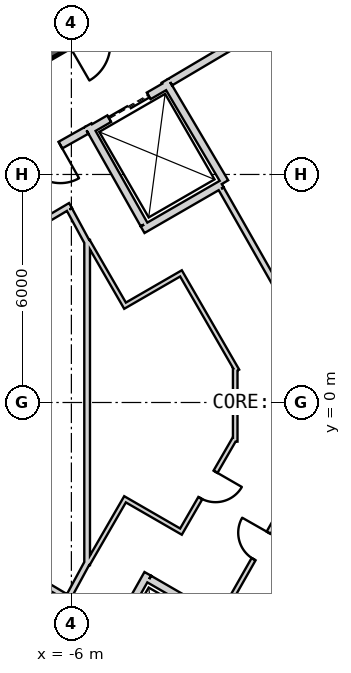
"""IFC4 building model, lengths in metres.
Left out: names, types, materials, properties, quantities, classifications, styles, units other than length and angle.
Written with IfcOpenShell. Run it as: python <this file> out.ifc"""

import sys

from ifc_helpers import new_model, si_unit, direction, frame, frame_2d, origin, place, context, subcontext, project, spatial, rectangle, extrude, element, fill, save


model = new_model("IFC4")
c1 = context("Model", 3, precision=1e-05, world=origin(), true_north=direction((0.0, 1.0)))
c2 = subcontext(c1, "Body", "Model", "MODEL_VIEW")
j1 = project(units=[si_unit("LENGTHUNIT", "METRE"), si_unit("PLANEANGLEUNIT", "RADIAN")], contexts=[c1])
p1 = place(None, origin())
s1 = spatial("IfcSite", under=j1, at=p1, CompositionType="ELEMENT")
p2 = place(p1, origin())
s2 = spatial("IfcBuilding", under=s1, at=p2, CompositionType="ELEMENT")
p3 = place(p2, origin())
s3 = spatial("IfcBuildingStorey", under=s2, at=p3, CompositionType="ELEMENT", Elevation=0.0)
p4 = place(p3, frame((19.475, 2.208, 0.0), z_axis=(0.0, 0.0, 1.0), x_axis=(-0.866028369851, 0.499994862586, 0.0)))
e1 = element("IfcWall", 1, at=p4, inside=s3, PredefinedType="SHEAR", context=c2, shape_type="SweptSolid", body=[
    extrude(rectangle(XDim=31.523, YDim=0.9, at=frame_2d((15.762, 0.0))), origin(), (0.0, 0.0, 1.0), 9.0),
])
p5 = place(p4, frame((7.062, 0.0, 0.0)))
e2 = element("IfcOpeningElement", 2, at=p5, cuts=e1, PredefinedType="OPENING", context=c2, shape_type="SweptSolid", body=[
    extrude(rectangle(XDim=1.2, YDim=2.4, at=frame_2d((0.6, 1.2))), frame((0.0, 0.46, 0.0), z_axis=(0.0, -1.0, 0.0), x_axis=(1.0, 0.0, 0.0)), (0.0, 0.0, 1.0), 0.92),
])
p6 = place(p4, frame((9.762, 0.0, 0.0)))
e3 = element("IfcOpeningElement", 3, at=p6, cuts=e1, PredefinedType="OPENING", context=c2, shape_type="SweptSolid", body=[
    extrude(rectangle(XDim=1.2, YDim=2.4, at=frame_2d((0.6, 1.2))), frame((0.0, 0.46, 0.0), z_axis=(0.0, -1.0, 0.0), x_axis=(1.0, 0.0, 0.0)), (0.0, 0.0, 1.0), 0.92),
])
p7 = place(p4, frame((12.462, 0.0, 0.0)))
e4 = element("IfcOpeningElement", 4, at=p7, cuts=e1, PredefinedType="OPENING", context=c2, shape_type="SweptSolid", body=[
    extrude(rectangle(XDim=1.2, YDim=2.4, at=frame_2d((0.6, 1.2))), frame((0.0, 0.46, 0.0), z_axis=(0.0, -1.0, 0.0), x_axis=(1.0, 0.0, 0.0)), (0.0, 0.0, 1.0), 0.92),
])
p8 = place(p4, frame((15.162, 0.0, 0.0)))
e5 = element("IfcOpeningElement", 5, at=p8, cuts=e1, PredefinedType="OPENING", context=c2, shape_type="SweptSolid", body=[
    extrude(rectangle(XDim=1.2, YDim=2.4, at=frame_2d((0.6, 1.2))), frame((0.0, 0.46, 0.0), z_axis=(0.0, -1.0, 0.0), x_axis=(1.0, 0.0, 0.0)), (0.0, 0.0, 1.0), 0.92),
])
p9 = place(p4, frame((17.862, 0.0, 0.0)))
e6 = element("IfcOpeningElement", 6, at=p9, cuts=e1, PredefinedType="OPENING", context=c2, shape_type="SweptSolid", body=[
    extrude(rectangle(XDim=1.2, YDim=2.4, at=frame_2d((0.6, 1.2))), frame((0.0, 0.46, 0.0), z_axis=(0.0, -1.0, 0.0), x_axis=(1.0, 0.0, 0.0)), (0.0, 0.0, 1.0), 0.92),
])
p10 = place(p4, frame((20.562, 0.0, 0.0)))
e7 = element("IfcOpeningElement", 7, at=p10, cuts=e1, PredefinedType="OPENING", context=c2, shape_type="SweptSolid", body=[
    extrude(rectangle(XDim=1.2, YDim=2.4, at=frame_2d((0.6, 1.2))), frame((0.0, 0.46, 0.0), z_axis=(0.0, -1.0, 0.0), x_axis=(1.0, 0.0, 0.0)), (0.0, 0.0, 1.0), 0.92),
])
p11 = place(p4, frame((23.262, 0.0, 0.0)))
e8 = element("IfcOpeningElement", 8, at=p11, cuts=e1, PredefinedType="OPENING", context=c2, shape_type="SweptSolid", body=[
    extrude(rectangle(XDim=1.2, YDim=2.4, at=frame_2d((0.6, 1.2))), frame((0.0, 0.46, 0.0), z_axis=(0.0, -1.0, 0.0), x_axis=(1.0, 0.0, 0.0)), (0.0, 0.0, 1.0), 0.92),
])
p12 = place(p4, frame((3.612, 0.0, 0.0)))
e9 = element("IfcOpeningElement", 9, at=p12, cuts=e1, PredefinedType="OPENING", context=c2, shape_type="SweptSolid", body=[
    extrude(rectangle(XDim=1.2, YDim=2.4, at=frame_2d((0.6, 1.2))), frame((0.0, 0.46, 0.0), z_axis=(0.0, -1.0, 0.0), x_axis=(1.0, 0.0, 0.0)), (0.0, 0.0, 1.0), 0.92),
])
p13 = place(p4, frame((26.712, 0.0, 0.0)))
e10 = element("IfcOpeningElement", 10, at=p13, cuts=e1, PredefinedType="OPENING", context=c2, shape_type="SweptSolid", body=[
    extrude(rectangle(XDim=1.2, YDim=2.4, at=frame_2d((0.6, 1.2))), frame((0.0, 0.46, 0.0), z_axis=(0.0, -1.0, 0.0), x_axis=(1.0, 0.0, 0.0)), (0.0, 0.0, 1.0), 0.92),
])
p14 = place(p3, frame((-7.825, -17.97, 0.0), z_axis=(0.0, 0.0, 1.0), x_axis=(0.866028369851, 0.499994862586, 0.0)))
e11 = element("IfcWall", 11, at=p14, inside=s3, PredefinedType="SHEAR", context=c2, shape_type="SweptSolid", body=[
    extrude(rectangle(XDim=31.523, YDim=0.9, at=frame_2d((15.762, 0.0))), origin(), (0.0, 0.0, 1.0), 9.0),
])
p15 = place(p14, frame((7.062, 0.0, 0.0)))
e12 = element("IfcOpeningElement", 12, at=p15, cuts=e11, PredefinedType="OPENING", context=c2, shape_type="SweptSolid", body=[
    extrude(rectangle(XDim=1.2, YDim=2.4, at=frame_2d((0.6, 1.2))), frame((0.0, 0.46, 0.0), z_axis=(0.0, -1.0, 0.0), x_axis=(1.0, 0.0, 0.0)), (0.0, 0.0, 1.0), 0.92),
])
p16 = place(p14, frame((9.762, 0.0, 0.0)))
e13 = element("IfcOpeningElement", 13, at=p16, cuts=e11, PredefinedType="OPENING", context=c2, shape_type="SweptSolid", body=[
    extrude(rectangle(XDim=1.2, YDim=2.4, at=frame_2d((0.6, 1.2))), frame((0.0, 0.46, 0.0), z_axis=(0.0, -1.0, 0.0), x_axis=(1.0, 0.0, 0.0)), (0.0, 0.0, 1.0), 0.92),
])
p17 = place(p14, frame((12.462, 0.0, 0.0)))
e14 = element("IfcOpeningElement", 14, at=p17, cuts=e11, PredefinedType="OPENING", context=c2, shape_type="SweptSolid", body=[
    extrude(rectangle(XDim=1.2, YDim=2.4, at=frame_2d((0.6, 1.2))), frame((0.0, 0.46, 0.0), z_axis=(0.0, -1.0, 0.0), x_axis=(1.0, 0.0, 0.0)), (0.0, 0.0, 1.0), 0.92),
])
p18 = place(p14, frame((15.162, 0.0, 0.0)))
e15 = element("IfcOpeningElement", 15, at=p18, cuts=e11, PredefinedType="OPENING", context=c2, shape_type="SweptSolid", body=[
    extrude(rectangle(XDim=1.2, YDim=2.4, at=frame_2d((0.6, 1.2))), frame((0.0, 0.46, 0.0), z_axis=(0.0, -1.0, 0.0), x_axis=(1.0, 0.0, 0.0)), (0.0, 0.0, 1.0), 0.92),
])
p19 = place(p14, frame((17.862, 0.0, 0.0)))
e16 = element("IfcOpeningElement", 16, at=p19, cuts=e11, PredefinedType="OPENING", context=c2, shape_type="SweptSolid", body=[
    extrude(rectangle(XDim=1.2, YDim=2.4, at=frame_2d((0.6, 1.2))), frame((0.0, 0.46, 0.0), z_axis=(0.0, -1.0, 0.0), x_axis=(1.0, 0.0, 0.0)), (0.0, 0.0, 1.0), 0.92),
])
p20 = place(p14, frame((20.562, 0.0, 0.0)))
e17 = element("IfcOpeningElement", 17, at=p20, cuts=e11, PredefinedType="OPENING", context=c2, shape_type="SweptSolid", body=[
    extrude(rectangle(XDim=1.2, YDim=2.4, at=frame_2d((0.6, 1.2))), frame((0.0, 0.46, 0.0), z_axis=(0.0, -1.0, 0.0), x_axis=(1.0, 0.0, 0.0)), (0.0, 0.0, 1.0), 0.92),
])
p21 = place(p14, frame((26.712, 0.0, 0.0)))
e18 = element("IfcOpeningElement", 18, at=p21, cuts=e11, PredefinedType="OPENING", context=c2, shape_type="SweptSolid", body=[
    extrude(rectangle(XDim=1.2, YDim=2.4, at=frame_2d((0.6, 1.2))), frame((0.0, 0.46, 0.0), z_axis=(0.0, -1.0, 0.0), x_axis=(1.0, 0.0, 0.0)), (0.0, 0.0, 1.0), 0.92),
])
p22 = place(p14, frame((3.612, 0.0, 0.0)))
e19 = element("IfcOpeningElement", 19, at=p22, cuts=e11, PredefinedType="OPENING", context=c2, shape_type="SweptSolid", body=[
    extrude(rectangle(XDim=1.2, YDim=2.4, at=frame_2d((0.6, 1.2))), frame((0.0, 0.46, 0.0), z_axis=(0.0, -1.0, 0.0), x_axis=(1.0, 0.0, 0.0)), (0.0, 0.0, 1.0), 0.92),
])
p23 = place(p3, frame((0.483, 8.936, 0.0), z_axis=(0.0, 0.0, 1.0), x_axis=(-0.874269620932, 0.485440655401, 0.0)))
e20 = element("IfcWall", 20, at=p23, inside=s3, PredefinedType="PLUMBINGWALL", context=c2, shape_type="SweptSolid", body=[
    extrude(rectangle(XDim=1.845, YDim=0.2, at=frame_2d((0.922, 0.0))), origin(), (0.0, 0.0, 1.0), 8.7),
])
p24 = place(p3, frame((-7.159, 8.8, -0.4), z_axis=(0.0, 0.0, 1.0), x_axis=(0.866047807691, 0.499961193289, 0.0)))
e21 = element("IfcWall", 21, at=p24, inside=s3, PredefinedType="SHEAR", context=c2, shape_type="SweptSolid", body=[
    extrude(rectangle(XDim=3.6, YDim=0.2, at=frame_2d((1.8, 0.0))), origin(), (0.0, 0.0, 1.0), 9.1),
])
p25 = place(p24, frame((1.25, 0.0, 0.4)))
e22 = element("IfcOpeningElement", 22, at=p25, cuts=e21, PredefinedType="OPENING", context=c2, shape_type="SweptSolid", body=[
    extrude(rectangle(XDim=1.1, YDim=2.1, at=frame_2d((0.55, 1.05))), frame((0.0, 0.11, 0.0), z_axis=(0.0, -1.0, 0.0), x_axis=(1.0, 0.0, 0.0)), (0.0, 0.0, 1.0), 0.22),
])
p26 = place(p3, frame((-5.524, 7.168, 0.0), z_axis=(0.0, 0.0, 1.0), x_axis=(0.866024647952, 0.500001309137, 0.0)))
e23 = element("IfcWall", 23, at=p26, inside=s3, PredefinedType="PLUMBINGWALL", context=c2, shape_type="SweptSolid", body=[
    extrude(rectangle(XDim=2.4, YDim=0.2, at=frame_2d((1.2, 0.0))), origin(), (0.0, 0.0, 1.0), 8.7),
])
p27 = place(p26, frame((0.6, 0.0, 0.0)))
e24 = element("IfcOpeningElement", 24, at=p27, cuts=e23, PredefinedType="OPENING", context=c2, shape_type="SweptSolid", body=[
    extrude(rectangle(XDim=1.2, YDim=2.4, at=frame_2d((0.6, 1.2))), frame((0.0, 0.11, 0.0), z_axis=(0.0, -1.0, 0.0), x_axis=(1.0, 0.0, 0.0)), (0.0, 0.0, 1.0), 0.22),
])
p28 = place(p3, frame((-3.538, 8.465, 0.0), z_axis=(0.0, 0.0, 1.0), x_axis=(0.508647062354, -0.860975125052, 0.0)))
e25 = element("IfcWall", 25, at=p28, inside=s3, PredefinedType="PLUMBINGWALL", context=c2, shape_type="SweptSolid", body=[
    extrude(rectangle(XDim=3.1, YDim=0.2, at=frame_2d((1.55, 0.0))), origin(), (0.0, 0.0, 1.0), 8.7),
])
p29 = place(p3, frame((-2.043, 5.748, 0.0), z_axis=(0.0, 0.0, 1.0), x_axis=(-0.866035096217, -0.499983211839, 0.0)))
e26 = element("IfcWall", 26, at=p29, inside=s3, PredefinedType="PLUMBINGWALL", context=c2, shape_type="SweptSolid", body=[
    extrude(rectangle(XDim=2.404, YDim=0.2, at=frame_2d((1.202, 0.0))), origin(), (0.0, 0.0, 1.0), 8.7),
])
p30 = place(p3, frame((-5.562, 7.296, 0.0), z_axis=(0.0, 0.0, 1.0), x_axis=(0.49134651263, -0.870964180966, 0.0)))
e27 = element("IfcWall", 27, at=p30, inside=s3, PredefinedType="PLUMBINGWALL", context=c2, shape_type="SweptSolid", body=[
    extrude(rectangle(XDim=3.0, YDim=0.2, at=frame_2d((1.5, 0.0))), origin(), (0.0, 0.0, 1.0), 8.7),
])
p31 = place(p3, frame((-3.99, -4.509, 0.0), z_axis=(0.0, 0.0, 1.0), x_axis=(-0.491358283181, -0.870957540612, 0.0)))
e28 = element("IfcWall", 28, at=p31, inside=s3, PredefinedType="PLUMBINGWALL", context=c2, shape_type="SweptSolid", body=[
    extrude(rectangle(XDim=3.2, YDim=0.2, at=frame_2d((1.6, 0.0))), origin(), (0.0, 0.0, 1.0), 8.7),
])
p32 = place(p3, frame((-3.953, -4.646, 0.0), z_axis=(0.0, 0.0, 1.0), x_axis=(0.866038900241, -0.499976622722, 0.0)))
e29 = element("IfcWall", 29, at=p32, inside=s3, PredefinedType="PLUMBINGWALL", context=c2, shape_type="SweptSolid", body=[
    extrude(rectangle(XDim=2.189, YDim=0.2, at=frame_2d((1.095, 0.0))), origin(), (0.0, 0.0, 1.0), 8.7),
])
p33 = place(p3, frame((-1.18, 9.744, 0.0), z_axis=(0.0, 0.0, 1.0), x_axis=(-0.860615607571, -0.509255118781, 0.0)))
e30 = element("IfcWall", 30, at=p33, inside=s3, PredefinedType="PARTITIONING", context=c2, shape_type="SweptSolid", body=[
    extrude(rectangle(XDim=2.581, YDim=0.2, at=frame_2d((1.29, 0.0))), origin(), (0.0, 0.0, 1.0), 8.7),
])
p34 = place(p3, frame((-5.6, 7.16, 0.0), z_axis=(0.0, 0.0, 1.0), x_axis=(-0.871363259478, -0.490638431059, 0.0)))
e31 = element("IfcWall", 31, at=p34, inside=s3, PredefinedType="PARTITIONING", context=c2, shape_type="SweptSolid", body=[
    extrude(rectangle(XDim=2.581, YDim=0.2, at=frame_2d((1.291, 0.0))), origin(), (0.0, 0.0, 1.0), 8.7),
])
p35 = place(p34, frame((0.791, 0.0, 0.0)))
e32 = element("IfcOpeningElement", 32, at=p35, cuts=e31, PredefinedType="OPENING", context=c2, shape_type="SweptSolid", body=[
    extrude(rectangle(XDim=1.0, YDim=2.1, at=frame_2d((0.5, 1.05))), frame((0.0, 0.11, 0.0), z_axis=(0.0, -1.0, 0.0), x_axis=(1.0, 0.0, 0.0)), (0.0, 0.0, 1.0), 0.22),
])
p36 = place(p3, frame((-2.059, 5.624, 0.0), z_axis=(0.0, 0.0, 1.0), x_axis=(0.494149180773, -0.869377125959, 0.0)))
e33 = element("IfcWall", 33, at=p36, inside=s3, PredefinedType="PLUMBINGWALL", context=c2, shape_type="SweptSolid", body=[
    extrude(rectangle(XDim=4.231, YDim=0.15, at=frame_2d((2.116, 0.0))), origin(), (0.0, 0.0, 1.0), 8.7),
])
p37 = place(p3, frame((0.094, -1.836, 0.0), z_axis=(0.0, 0.0, 1.0), x_axis=(-0.494097972448, -0.869406230495, 0.0)))
e34 = element("IfcWall", 34, at=p37, inside=s3, PredefinedType="PARTITIONING", context=c2, shape_type="SweptSolid", body=[
    extrude(rectangle(XDim=4.357, YDim=0.12, at=frame_2d((2.179, 0.0))), origin(), (0.0, 0.0, 1.0), 8.7),
])
p38 = place(p37, frame((1.83, 0.0, 0.0)))
e35 = element("IfcOpeningElement", 35, at=p38, cuts=e34, PredefinedType="OPENING", context=c2, shape_type="SweptSolid", body=[
    extrude(rectangle(XDim=0.8, YDim=2.1, at=frame_2d((0.4, 1.05))), frame((0.0, 0.07, 0.0), z_axis=(0.0, -1.0, 0.0), x_axis=(1.0, 0.0, 0.0)), (0.0, 0.0, 1.0), 0.14),
])
p39 = place(p3, frame((-5.586, -4.275, 0.0), z_axis=(0.0, 0.0, 1.0), x_axis=(0.0, 1.0, 0.0)))
e36 = element("IfcWall", 36, at=p39, inside=s3, PredefinedType="PLUMBINGWALL", context=c2, shape_type="SweptSolid", body=[
    extrude(rectangle(XDim=8.549, YDim=0.15, at=frame_2d((4.275, 0.0))), origin(), (0.0, 0.0, 1.0), 8.7),
])
p40 = place(p3, frame((-6.124, -5.211, 0.0), z_axis=(0.0, 0.0, 1.0), x_axis=(0.476228984866, 0.879321303036, 0.0)))
e37 = element("IfcWall", 37, at=p40, inside=s3, PredefinedType="PLUMBINGWALL", context=c2, shape_type="SweptSolid", body=[
    extrude(rectangle(XDim=1.162, YDim=0.15, at=frame_2d((0.581, 0.0))), origin(), (0.0, 0.0, 1.0), 8.7),
])
p41 = place(p3, frame((-7.95, -4.041, 0.0), z_axis=(0.0, 0.0, 1.0), x_axis=(0.860090281069, -0.510141851263, 0.0)))
e38 = element("IfcWall", 38, at=p41, inside=s3, PredefinedType="PLUMBINGWALL", context=c2, shape_type="SweptSolid", body=[
    extrude(rectangle(XDim=2.089, YDim=0.15, at=frame_2d((1.045, 0.0))), origin(), (0.0, 0.0, 1.0), 8.7),
])
p42 = place(p3, frame((-6.024, 5.183, 0.0), z_axis=(0.0, 0.0, 1.0), x_axis=(-0.860126804455, -0.510080268447, 0.0)))
e39 = element("IfcWall", 39, at=p42, inside=s3, PredefinedType="PLUMBINGWALL", context=c2, shape_type="SweptSolid", body=[
    extrude(rectangle(XDim=2.24, YDim=0.15, at=frame_2d((1.12, 0.0))), origin(), (0.0, 0.0, 1.0), 8.7),
])
p43 = place(p42, frame((0.757, 0.0, 0.0)))
e40 = element("IfcOpeningElement", 40, at=p43, cuts=e39, PredefinedType="OPENING", context=c2, shape_type="SweptSolid", body=[
    extrude(rectangle(XDim=0.8, YDim=2.1, at=frame_2d((0.4, 1.05))), frame((0.0, 0.085, 0.0), z_axis=(0.0, -1.0, 0.0), x_axis=(1.0, 0.0, 0.0)), (0.0, 0.0, 1.0), 0.17),
])
p44 = place(p3, frame((-5.571, 4.19, 0.0), z_axis=(0.0, 0.0, 1.0), x_axis=(-0.476127658675, 0.879376172434, 0.0)))
e41 = element("IfcWall", 41, at=p44, inside=s3, PredefinedType="PLUMBINGWALL", context=c2, shape_type="SweptSolid", body=[
    extrude(rectangle(XDim=1.012, YDim=0.15, at=frame_2d((0.506, 0.0))), origin(), (0.0, 0.0, 1.0), 8.7),
])
p45 = place(p3, frame((-4.558, 2.495, 0.0), z_axis=(0.0, 0.0, 1.0), x_axis=(-0.499990325971, 0.866030989016, 0.0)))
e42 = element("IfcWall", 42, at=p45, inside=s3, PredefinedType="PARTITIONING", context=c2, shape_type="SweptSolid", body=[
    extrude(rectangle(XDim=2.025, YDim=0.12, at=frame_2d((1.012, 0.0))), origin(), (0.0, 0.0, 1.0), 8.7),
])
p46 = place(p3, frame((-3.064, 3.427, 0.0), z_axis=(0.0, 0.0, 1.0), x_axis=(-0.866087547558, -0.499892348375, 0.0)))
e43 = element("IfcWall", 43, at=p46, inside=s3, PredefinedType="PARTITIONING", context=c2, shape_type="SweptSolid", body=[
    extrude(rectangle(XDim=1.7, YDim=0.12, at=frame_2d((0.85, 0.0))), origin(), (0.0, 0.0, 1.0), 8.7),
])
p47 = place(p3, frame((-1.637, 0.835, 0.0), z_axis=(0.0, 0.0, 1.0), x_axis=(-0.499980071345, 0.866036909293, 0.0)))
e44 = element("IfcWall", 44, at=p47, inside=s3, PredefinedType="PARTITIONING", context=c2, shape_type="SweptSolid", body=[
    extrude(rectangle(XDim=2.898, YDim=0.12, at=frame_2d((1.449, 0.0))), origin(), (0.0, 0.0, 1.0), 8.7),
])
p48 = place(p3, frame((-1.689, -1.029, 0.0), z_axis=(0.0, 0.0, 1.0), x_axis=(0.0, 1.0, 0.0)))
e45 = element("IfcWall", 45, at=p48, inside=s3, PredefinedType="PARTITIONING", context=c2, shape_type="SweptSolid", body=[
    extrude(rectangle(XDim=1.935, YDim=0.12, at=frame_2d((0.968, 0.0))), origin(), (0.0, 0.0, 1.0), 8.7),
])
p49 = place(p3, frame((-3.146, -3.449, 0.0), z_axis=(0.0, 0.0, 1.0), x_axis=(0.500028961621, 0.866008682139, 0.0)))
e46 = element("IfcWall", 46, at=p49, inside=s3, PredefinedType="PARTITIONING", context=c2, shape_type="SweptSolid", body=[
    extrude(rectangle(XDim=2.896, YDim=0.12, at=frame_2d((1.448, 0.0))), origin(), (0.0, 0.0, 1.0), 8.7),
])
p50 = place(p49, frame((1.078, 0.0, 0.0)))
e47 = element("IfcOpeningElement", 47, at=p50, cuts=e46, PredefinedType="OPENING", context=c2, shape_type="SweptSolid", body=[
    extrude(rectangle(XDim=0.8, YDim=2.1, at=frame_2d((0.4, 1.05))), frame((0.0, 0.07, 0.0), z_axis=(0.0, -1.0, 0.0), x_axis=(1.0, 0.0, 0.0)), (0.0, 0.0, 1.0), 0.14),
])
p51 = place(p3, frame((-4.64, -2.517, 0.0), z_axis=(0.0, 0.0, 1.0), x_axis=(0.865989465428, -0.500062241894, 0.0)))
e48 = element("IfcWall", 48, at=p51, inside=s3, PredefinedType="PARTITIONING", context=c2, shape_type="SweptSolid", body=[
    extrude(rectangle(XDim=1.7, YDim=0.12, at=frame_2d((0.85, 0.0))), origin(), (0.0, 0.0, 1.0), 8.7),
])
p52 = place(p3, frame((-5.571, -4.249, 0.0), z_axis=(0.0, 0.0, 1.0), x_axis=(0.500081145431, 0.865978549379, 0.0)))
e49 = element("IfcWall", 49, at=p52, inside=s3, PredefinedType="PARTITIONING", context=c2, shape_type="SweptSolid", body=[
    extrude(rectangle(XDim=1.905, YDim=0.12, at=frame_2d((0.953, 0.0))), origin(), (0.0, 0.0, 1.0), 8.7),
])
p53 = place(p3, frame((18.544, 7.965, 0.0), z_axis=(0.0, 0.0, 1.0), x_axis=(-0.866028877706, 0.499993982943, 0.0)))
e50 = element("IfcWall", 50, at=p53, inside=s3, PredefinedType="PARTITIONING", context=c2, shape_type="SweptSolid", body=[
    extrude(rectangle(XDim=24.154, YDim=0.12, at=frame_2d((12.077, 0.0))), origin(), (0.0, 0.0, 1.0), 8.08),
])
p54 = place(p53, frame((17.517, 0.0, 0.0)))
e51 = element("IfcOpeningElement", 51, at=p54, cuts=e50, PredefinedType="OPENING", context=c2, shape_type="SweptSolid", body=[
    extrude(rectangle(XDim=1.8, YDim=2.1, at=frame_2d((0.9, 1.05))), frame((0.0, 0.07, 0.0), z_axis=(0.0, -1.0, 0.0), x_axis=(1.0, 0.0, 0.0)), (0.0, 0.0, 1.0), 0.14),
])
p55 = place(p53, frame((11.117, 0.0, 0.0)))
e52 = element("IfcOpeningElement", 52, at=p55, cuts=e50, PredefinedType="OPENING", context=c2, shape_type="SweptSolid", body=[
    extrude(rectangle(XDim=1.8, YDim=2.1, at=frame_2d((0.9, 1.05))), frame((0.0, 0.07, 0.0), z_axis=(0.0, -1.0, 0.0), x_axis=(1.0, 0.0, 0.0)), (0.0, 0.0, 1.0), 0.14),
])
p56 = place(p53, frame((4.917, 0.0, 0.0)))
e53 = element("IfcOpeningElement", 53, at=p56, cuts=e50, PredefinedType="OPENING", context=c2, shape_type="SweptSolid", body=[
    extrude(rectangle(XDim=1.8, YDim=2.1, at=frame_2d((0.9, 1.05))), frame((0.0, 0.07, 0.0), z_axis=(0.0, -1.0, 0.0), x_axis=(1.0, 0.0, 0.0)), (0.0, 0.0, 1.0), 0.14),
])
p57 = place(p35, origin())
e54 = element("IfcDoor", 54, at=p57, inside=s3, OperationType="SINGLE_SWING_LEFT", PredefinedType="USERDEFINED", context=c2, shape_type="SweptSolid", body=[
    extrude(rectangle(XDim=1.0, YDim=2.1, at=frame_2d((0.5, 1.05))), frame((0.0, 0.025, 0.0), z_axis=(0.0, -1.0, 0.0), x_axis=(1.0, 0.0, 0.0)), (0.0, 0.0, 1.0), 0.05),
])
fill(e32, e54)
p58 = place(p27, origin())
e55 = element("IfcDoor", 55, at=p58, inside=s3, OperationType="SLIDING_TO_LEFT", PredefinedType="USERDEFINED", context=c2, shape_type="SweptSolid", body=[
    extrude(rectangle(XDim=1.2, YDim=2.4, at=frame_2d((0.6, 1.2))), frame((0.0, 0.025, 0.0), z_axis=(0.0, -1.0, 0.0), x_axis=(1.0, 0.0, 0.0)), (0.0, 0.0, 1.0), 0.05),
])
fill(e24, e55)
p59 = place(p38, origin())
e56 = element("IfcDoor", 56, at=p59, inside=s3, OperationType="SINGLE_SWING_LEFT", PredefinedType="USERDEFINED", context=c2, shape_type="SweptSolid", body=[
    extrude(rectangle(XDim=0.8, YDim=2.1, at=frame_2d((0.4, 1.05))), frame((0.0, 0.025, 0.0), z_axis=(0.0, -1.0, 0.0), x_axis=(1.0, 0.0, 0.0)), (0.0, 0.0, 1.0), 0.05),
])
fill(e35, e56)
p60 = place(p50, origin())
e57 = element("IfcDoor", 57, at=p60, inside=s3, OperationType="SINGLE_SWING_RIGHT", PredefinedType="USERDEFINED", context=c2, shape_type="SweptSolid", body=[
    extrude(rectangle(XDim=0.8, YDim=2.1, at=frame_2d((0.4, 1.05))), frame((0.0, 0.025, 0.0), z_axis=(0.0, -1.0, 0.0), x_axis=(1.0, 0.0, 0.0)), (0.0, 0.0, 1.0), 0.05),
])
fill(e47, e57)
save(model, sys.argv[1])
